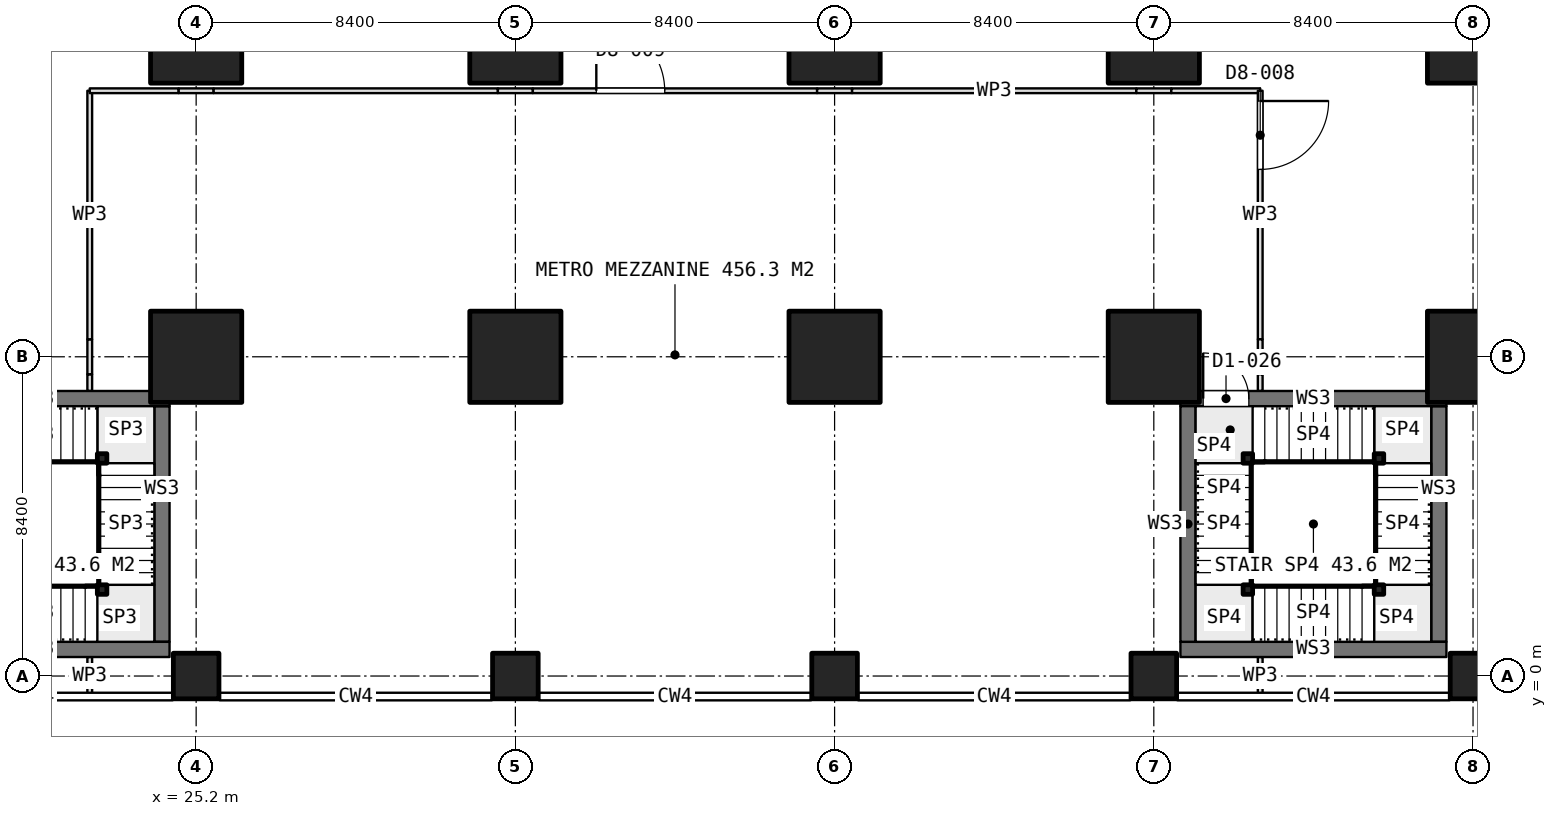
"""IFC4 building model, lengths in metres.
Left out: names, types, materials, properties, quantities, classifications, styles, units other than length and angle.
Written with IfcOpenShell. Run it as: python <this file> out.ifc"""

import sys

from ifc_helpers import new_model, si_unit, direction, frame, frame_2d, origin, origin_2d, place, context, subcontext, project, spatial, rectangle, extrude, element, fill, save


model = new_model("IFC4")
c1 = context("Model", 3, precision=1e-05, world=origin(), true_north=direction((0.0, 1.0)))
c2 = subcontext(c1, "Body", "Model", "MODEL_VIEW")
j1 = project(units=[si_unit("LENGTHUNIT", "METRE"), si_unit("PLANEANGLEUNIT", "RADIAN")], contexts=[c1])
p1 = place(None, origin())
s1 = spatial("IfcSite", under=j1, at=p1, CompositionType="ELEMENT")
p2 = place(p1, origin())
s2 = spatial("IfcBuilding", under=s1, at=p2, CompositionType="ELEMENT")
p3 = place(p2, frame((0.0, 0.0, 5.4)))
s3 = spatial("IfcBuildingStorey", under=s2, at=p3, CompositionType="ELEMENT", Elevation=5.4)
p4 = place(p3, frame((25.2, 0.0, 0.0), z_axis=(0.0, 0.0, 1.0), x_axis=(1.0, 0.0, 0.0)))
e1 = element("IfcColumn", 1, at=p4, inside=s3, PredefinedType="COLUMN", context=c2, shape_type="SweptSolid", body=[
    extrude(rectangle(XDim=1.2, YDim=1.2, at=origin_2d()), origin(), (0.0, 0.0, 1.0), 5.0),
])
for number, where, z_axis, x_axis in (
    (2, (25.2, 8.4, 0.0), (0.0, 0.0, 1.0), (1.0, 0.0, 0.0)),
    (3, (25.2, 16.8, 0.0), (0.0, 0.0, 1.0), (1.0, 0.0, 0.0)),
):
    element("IfcColumn", number, at=place(p3, frame(where, z_axis=z_axis, x_axis=x_axis)), inside=s3, PredefinedType="COLUMN", context=c2, shape_type="SweptSolid", body=[
        extrude(rectangle(XDim=2.4, YDim=2.4, at=origin_2d()), origin(), (0.0, 0.0, 1.0), 5.0),
    ])
p5 = place(p3, frame((33.6, 0.0, 0.0), z_axis=(0.0, 0.0, 1.0), x_axis=(1.0, 0.0, 0.0)))
e4 = element("IfcColumn", 4, at=p5, inside=s3, PredefinedType="COLUMN", context=c2, shape_type="SweptSolid", body=[
    extrude(rectangle(XDim=1.2, YDim=1.2, at=origin_2d()), origin(), (0.0, 0.0, 1.0), 5.0),
])
for number, where, z_axis, x_axis in (
    (5, (33.6, 8.4, 0.0), (0.0, 0.0, 1.0), (1.0, 0.0, 0.0)),
    (6, (33.6, 16.8, 0.0), (0.0, 0.0, 1.0), (1.0, 0.0, 0.0)),
):
    element("IfcColumn", number, at=place(p3, frame(where, z_axis=z_axis, x_axis=x_axis)), inside=s3, PredefinedType="COLUMN", context=c2, shape_type="SweptSolid", body=[
        extrude(rectangle(XDim=2.4, YDim=2.4, at=origin_2d()), origin(), (0.0, 0.0, 1.0), 5.0),
    ])
p6 = place(p3, frame((42.0, 0.0, 0.0), z_axis=(0.0, 0.0, 1.0), x_axis=(1.0, 0.0, 0.0)))
e7 = element("IfcColumn", 7, at=p6, inside=s3, PredefinedType="COLUMN", context=c2, shape_type="SweptSolid", body=[
    extrude(rectangle(XDim=1.2, YDim=1.2, at=origin_2d()), origin(), (0.0, 0.0, 1.0), 5.0),
])
for number, where, z_axis, x_axis in (
    (8, (42.0, 8.4, 0.0), (0.0, 0.0, 1.0), (1.0, 0.0, 0.0)),
    (9, (42.0, 16.8, 0.0), (0.0, 0.0, 1.0), (1.0, 0.0, 0.0)),
):
    element("IfcColumn", number, at=place(p3, frame(where, z_axis=z_axis, x_axis=x_axis)), inside=s3, PredefinedType="COLUMN", context=c2, shape_type="SweptSolid", body=[
        extrude(rectangle(XDim=2.4, YDim=2.4, at=origin_2d()), origin(), (0.0, 0.0, 1.0), 5.0),
    ])
p7 = place(p3, frame((50.4, 0.0, 0.0), z_axis=(0.0, 0.0, 1.0), x_axis=(1.0, 0.0, 0.0)))
e10 = element("IfcColumn", 10, at=p7, inside=s3, PredefinedType="COLUMN", context=c2, shape_type="SweptSolid", body=[
    extrude(rectangle(XDim=1.2, YDim=1.2, at=origin_2d()), origin(), (0.0, 0.0, 1.0), 5.0),
])
for number, where, z_axis, x_axis in (
    (11, (50.4, 8.4, 0.0), (0.0, 0.0, 1.0), (1.0, 0.0, 0.0)),
    (12, (50.4, 16.8, 0.0), (0.0, 0.0, 1.0), (1.0, 0.0, 0.0)),
):
    element("IfcColumn", number, at=place(p3, frame(where, z_axis=z_axis, x_axis=x_axis)), inside=s3, PredefinedType="COLUMN", context=c2, shape_type="SweptSolid", body=[
        extrude(rectangle(XDim=2.4, YDim=2.4, at=origin_2d()), origin(), (0.0, 0.0, 1.0), 5.0),
    ])
p8 = place(p3, frame((58.8, 0.0, 0.0), z_axis=(0.0, 0.0, 1.0), x_axis=(1.0, 0.0, 0.0)))
e13 = element("IfcColumn", 13, at=p8, inside=s3, PredefinedType="COLUMN", context=c2, shape_type="SweptSolid", body=[
    extrude(rectangle(XDim=1.2, YDim=1.2, at=origin_2d()), origin(), (0.0, 0.0, 1.0), 5.0),
])
for number, where, z_axis, x_axis in (
    (14, (58.8, 8.4, 0.0), (0.0, 0.0, 1.0), (1.0, 0.0, 0.0)),
    (15, (58.8, 16.8, 0.0), (0.0, 0.0, 1.0), (1.0, 0.0, 0.0)),
):
    element("IfcColumn", number, at=place(p3, frame(where, z_axis=z_axis, x_axis=x_axis)), inside=s3, PredefinedType="COLUMN", context=c2, shape_type="SweptSolid", body=[
        extrude(rectangle(XDim=2.4, YDim=2.4, at=origin_2d()), origin(), (0.0, 0.0, 1.0), 5.0),
    ])
p9 = place(p3, frame((17.5, 0.7, 0.0), z_axis=(0.0, 0.0, 1.0), x_axis=(1.0, 0.0, 0.0)))
e16 = element("IfcWall", 16, at=p9, inside=s3, PredefinedType="SOLIDWALL", context=c2, shape_type="SweptSolid", body=[
    extrude(rectangle(XDim=7.0, YDim=0.4, at=frame_2d((3.5, 0.0))), origin(), (0.0, 0.0, 1.0), 4.7),
])
p10 = place(p3, frame((17.5, 7.3, 0.0), z_axis=(0.0, 0.0, 1.0), x_axis=(1.0, 0.0, 0.0)))
e17 = element("IfcWall", 17, at=p10, inside=s3, PredefinedType="SOLIDWALL", context=c2, shape_type="SweptSolid", body=[
    extrude(rectangle(XDim=7.0, YDim=0.4, at=frame_2d((3.5, 0.0))), origin(), (0.0, 0.0, 1.0), 4.7),
])
p11 = place(p10, frame((0.6, 0.0, 0.0)))
e18 = element("IfcOpeningElement", 18, at=p11, cuts=e17, PredefinedType="OPENING", context=c2, shape_type="SweptSolid", body=[
    extrude(rectangle(XDim=1.2, YDim=2.1, at=frame_2d((0.6, 1.05))), frame((0.0, 0.21, 0.0), z_axis=(0.0, -1.0, 0.0), x_axis=(1.0, 0.0, 0.0)), (0.0, 0.0, 1.0), 0.42),
])
p12 = place(p3, frame((24.3, 0.9, 0.0), z_axis=(0.0, 0.0, 1.0), x_axis=(0.0, 1.0, 0.0)))
e19 = element("IfcWall", 19, at=p12, inside=s3, PredefinedType="SOLIDWALL", context=c2, shape_type="SweptSolid", body=[
    extrude(rectangle(XDim=6.2, YDim=0.4, at=frame_2d((3.1, 0.0))), origin(), (0.0, 0.0, 1.0), 4.7),
])
p13 = place(p3, frame((51.1, 0.7, 0.0), z_axis=(0.0, 0.0, 1.0), x_axis=(1.0, 0.0, 0.0)))
e20 = element("IfcWall", 20, at=p13, inside=s3, PredefinedType="SOLIDWALL", context=c2, shape_type="SweptSolid", body=[
    extrude(rectangle(XDim=7.0, YDim=0.4, at=frame_2d((3.5, 0.0))), origin(), (0.0, 0.0, 1.0), 4.7),
])
p14 = place(p3, frame((51.1, 7.3, 0.0), z_axis=(0.0, 0.0, 1.0), x_axis=(1.0, 0.0, 0.0)))
e21 = element("IfcWall", 21, at=p14, inside=s3, PredefinedType="SOLIDWALL", context=c2, shape_type="SweptSolid", body=[
    extrude(rectangle(XDim=7.0, YDim=0.4, at=frame_2d((3.5, 0.0))), origin(), (0.0, 0.0, 1.0), 4.7),
])
p15 = place(p14, frame((0.6, 0.0, 0.0)))
e22 = element("IfcOpeningElement", 22, at=p15, cuts=e21, PredefinedType="OPENING", context=c2, shape_type="SweptSolid", body=[
    extrude(rectangle(XDim=1.2, YDim=2.1, at=frame_2d((0.6, 1.05))), frame((0.0, 0.21, 0.0), z_axis=(0.0, -1.0, 0.0), x_axis=(1.0, 0.0, 0.0)), (0.0, 0.0, 1.0), 0.42),
])
for number, where, z_axis, x_axis in (
    (23, (51.3, 0.9, 0.0), (0.0, 0.0, 1.0), (0.0, 1.0, 0.0)),
    (24, (57.9, 0.9, 0.0), (0.0, 0.0, 1.0), (0.0, 1.0, 0.0)),
):
    element("IfcWall", number, at=place(p3, frame(where, z_axis=z_axis, x_axis=x_axis)), inside=s3, PredefinedType="SOLIDWALL", context=c2, shape_type="SweptSolid", body=[
        extrude(rectangle(XDim=6.2, YDim=0.4, at=frame_2d((3.1, 0.0))), origin(), (0.0, 0.0, 1.0), 4.7),
    ])
p16 = place(p3, frame((22.4, 7.5, 0.0), z_axis=(0.0, 0.0, 1.0), x_axis=(0.0, 1.0, 0.0)))
e25 = element("IfcWall", 25, at=p16, inside=s3, PredefinedType="PARTITIONING", context=c2, shape_type="SweptSolid", body=[
    extrude(rectangle(XDim=0.44, YDim=0.125, at=frame_2d((0.22, 0.0))), origin(), (0.0, 0.0, 1.0), 4.7),
])
p17 = place(p3, frame((22.4, 7.94, 0.0), z_axis=(0.0, 0.0, 1.0), x_axis=(0.0, 1.0, 0.0)))
e26 = element("IfcWall", 26, at=p17, inside=s3, PredefinedType="PARTITIONING", context=c2, shape_type="SweptSolid", body=[
    extrude(rectangle(XDim=0.92, YDim=0.125, at=frame_2d((0.46, 0.0))), origin(), (0.0, 0.0, 1.0), 2.9),
])
p18 = place(p3, frame((22.4, 8.86, 0.0), z_axis=(0.0, 0.0, 1.0), x_axis=(0.0, 1.0, 0.0)))
e27 = element("IfcWall", 27, at=p18, inside=s3, PredefinedType="PARTITIONING", context=c2, shape_type="SweptSolid", body=[
    extrude(rectangle(XDim=6.54, YDim=0.125, at=frame_2d((3.27, 0.0))), origin(), (0.0, 0.0, 1.0), 4.7),
])
p19 = place(p3, frame((22.4, 15.4, 0.0), z_axis=(0.0, 0.0, 1.0), x_axis=(1.0, 0.0, 0.0)))
e28 = element("IfcWall", 28, at=p19, inside=s3, PredefinedType="PARTITIONING", context=c2, shape_type="SweptSolid", body=[
    extrude(rectangle(XDim=2.34, YDim=0.125, at=frame_2d((1.17, 0.0))), origin(), (0.0, 0.0, 1.0), 4.7),
])
p20 = place(p3, frame((24.74, 15.4, 0.0), z_axis=(0.0, 0.0, 1.0), x_axis=(1.0, 0.0, 0.0)))
e29 = element("IfcWall", 29, at=p20, inside=s3, PredefinedType="PARTITIONING", context=c2, shape_type="SweptSolid", body=[
    extrude(rectangle(XDim=0.92, YDim=0.125, at=frame_2d((0.46, 0.0))), origin(), (0.0, 0.0, 1.0), 2.9),
])
p21 = place(p3, frame((25.66, 15.4, 0.0), z_axis=(0.0, 0.0, 1.0), x_axis=(1.0, 0.0, 0.0)))
e30 = element("IfcWall", 30, at=p21, inside=s3, PredefinedType="PARTITIONING", context=c2, shape_type="SweptSolid", body=[
    extrude(rectangle(XDim=7.48, YDim=0.125, at=frame_2d((3.74, 0.0))), origin(), (0.0, 0.0, 1.0), 4.7),
])
p22 = place(p3, frame((33.14, 15.4, 0.0), z_axis=(0.0, 0.0, 1.0), x_axis=(1.0, 0.0, 0.0)))
e31 = element("IfcWall", 31, at=p22, inside=s3, PredefinedType="PARTITIONING", context=c2, shape_type="SweptSolid", body=[
    extrude(rectangle(XDim=0.92, YDim=0.125, at=frame_2d((0.46, 0.0))), origin(), (0.0, 0.0, 1.0), 2.9),
])
p23 = place(p3, frame((34.06, 15.4, 0.0), z_axis=(0.0, 0.0, 1.0), x_axis=(1.0, 0.0, 0.0)))
e32 = element("IfcWall", 32, at=p23, inside=s3, PredefinedType="PARTITIONING", context=c2, shape_type="SweptSolid", body=[
    extrude(rectangle(XDim=7.48, YDim=0.125, at=frame_2d((3.74, 0.0))), origin(), (0.0, 0.0, 1.0), 4.7),
])
p24 = place(p23, frame((1.67, 0.0, 0.0)))
e33 = element("IfcOpeningElement", 33, at=p24, cuts=e32, PredefinedType="OPENING", context=c2, shape_type="SweptSolid", body=[
    extrude(rectangle(XDim=1.8, YDim=2.1, at=frame_2d((0.9, 1.05))), frame((0.0, 0.073, 0.0), z_axis=(0.0, -1.0, 0.0), x_axis=(1.0, 0.0, 0.0)), (0.0, 0.0, 1.0), 0.145),
])
p25 = place(p3, frame((41.54, 15.4, 0.0), z_axis=(0.0, 0.0, 1.0), x_axis=(1.0, 0.0, 0.0)))
e34 = element("IfcWall", 34, at=p25, inside=s3, PredefinedType="PARTITIONING", context=c2, shape_type="SweptSolid", body=[
    extrude(rectangle(XDim=0.92, YDim=0.125, at=frame_2d((0.46, 0.0))), origin(), (0.0, 0.0, 1.0), 2.9),
])
p26 = place(p3, frame((42.46, 15.4, 0.0), z_axis=(0.0, 0.0, 1.0), x_axis=(1.0, 0.0, 0.0)))
e35 = element("IfcWall", 35, at=p26, inside=s3, PredefinedType="PARTITIONING", context=c2, shape_type="SweptSolid", body=[
    extrude(rectangle(XDim=7.48, YDim=0.125, at=frame_2d((3.74, 0.0))), origin(), (0.0, 0.0, 1.0), 4.7),
])
p27 = place(p3, frame((49.94, 15.4, 0.0), z_axis=(0.0, 0.0, 1.0), x_axis=(1.0, 0.0, 0.0)))
e36 = element("IfcWall", 36, at=p27, inside=s3, PredefinedType="PARTITIONING", context=c2, shape_type="SweptSolid", body=[
    extrude(rectangle(XDim=0.92, YDim=0.125, at=frame_2d((0.46, 0.0))), origin(), (0.0, 0.0, 1.0), 2.9),
])
p28 = place(p3, frame((50.86, 15.4, 0.0), z_axis=(0.0, 0.0, 1.0), x_axis=(1.0, 0.0, 0.0)))
e37 = element("IfcWall", 37, at=p28, inside=s3, PredefinedType="PARTITIONING", context=c2, shape_type="SweptSolid", body=[
    extrude(rectangle(XDim=2.34, YDim=0.125, at=frame_2d((1.17, 0.0))), origin(), (0.0, 0.0, 1.0), 4.7),
])
p29 = place(p3, frame((53.2, 15.4, 0.0), z_axis=(0.0, 0.0, 1.0), x_axis=(0.0, -1.0, 0.0)))
e38 = element("IfcWall", 38, at=p29, inside=s3, PredefinedType="PARTITIONING", context=c2, shape_type="SweptSolid", body=[
    extrude(rectangle(XDim=6.54, YDim=0.125, at=frame_2d((3.27, 0.0))), origin(), (0.0, 0.0, 1.0), 4.7),
])
p30 = place(p29, frame((0.27, 0.0, 0.0)))
e39 = element("IfcOpeningElement", 39, at=p30, cuts=e38, PredefinedType="OPENING", context=c2, shape_type="SweptSolid", body=[
    extrude(rectangle(XDim=1.8, YDim=2.1, at=frame_2d((0.9, 1.05))), frame((0.0, 0.073, 0.0), z_axis=(0.0, -1.0, 0.0), x_axis=(1.0, 0.0, 0.0)), (0.0, 0.0, 1.0), 0.145),
])
p31 = place(p3, frame((53.2, 8.86, 0.0), z_axis=(0.0, 0.0, 1.0), x_axis=(0.0, -1.0, 0.0)))
e40 = element("IfcWall", 40, at=p31, inside=s3, PredefinedType="PARTITIONING", context=c2, shape_type="SweptSolid", body=[
    extrude(rectangle(XDim=0.92, YDim=0.125, at=frame_2d((0.46, 0.0))), origin(), (0.0, 0.0, 1.0), 2.9),
])
p32 = place(p3, frame((53.2, 7.94, 0.0), z_axis=(0.0, 0.0, 1.0), x_axis=(0.0, -1.0, 0.0)))
e41 = element("IfcWall", 41, at=p32, inside=s3, PredefinedType="PARTITIONING", context=c2, shape_type="SweptSolid", body=[
    extrude(rectangle(XDim=0.44, YDim=0.125, at=frame_2d((0.22, 0.0))), origin(), (0.0, 0.0, 1.0), 4.7),
])
for number, where, z_axis, x_axis in (
    (42, (53.2, 0.5, 0.0), (0.0, 0.0, 1.0), (0.0, -1.0, 0.0)),
    (43, (22.4, -0.49, 0.0), (0.0, 0.0, 1.0), (0.0, 1.0, 0.0)),
):
    element("IfcWall", number, at=place(p3, frame(where, z_axis=z_axis, x_axis=x_axis)), inside=s3, PredefinedType="PARTITIONING", context=c2, shape_type="SweptSolid", body=[
        extrude(rectangle(XDim=0.99, YDim=0.125, at=frame_2d((0.495, 0.0))), origin(), (0.0, 0.0, 1.0), 2.9),
    ])
for number, where, z_axis, x_axis in (
    (44, (22.725, 2.275, 0.0), (0.0, 0.0, 1.0), (1.0, 0.0, 0.0)),
    (45, (22.725, 5.725, 0.0), (0.0, 0.0, 1.0), (1.0, 0.0, 0.0)),
    (46, (52.875, 5.725, 0.0), (0.0, 0.0, 1.0), (1.0, 0.0, 0.0)),
    (47, (52.875, 2.275, 0.0), (0.0, 0.0, 1.0), (1.0, 0.0, 0.0)),
    (48, (56.325, 2.275, 0.0), (0.0, 0.0, 1.0), (1.0, 0.0, 0.0)),
    (49, (56.325, 5.725, 0.0), (0.0, 0.0, 1.0), (1.0, 0.0, 0.0)),
):
    element("IfcColumn", number, at=place(p3, frame(where, z_axis=z_axis, x_axis=x_axis)), inside=s3, PredefinedType="COLUMN", context=c2, shape_type="SweptSolid", body=[
        extrude(rectangle(XDim=0.25, YDim=0.25, at=origin_2d()), origin(), (0.0, 0.0, 1.0), 5.0),
    ])
p33 = place(p24, origin())
e50 = element("IfcDoor", 50, at=p33, inside=s3, OperationType="DOUBLE_DOOR_SINGLE_SWING", PredefinedType="DOOR", context=c2, shape_type="SweptSolid", body=[
    extrude(rectangle(XDim=1.8, YDim=2.1, at=frame_2d((0.9, 1.05))), frame((0.0, 0.025, 0.0), z_axis=(0.0, -1.0, 0.0), x_axis=(1.0, 0.0, 0.0)), (0.0, 0.0, 1.0), 0.05),
])
fill(e33, e50)
p34 = place(p30, origin())
e51 = element("IfcDoor", 51, at=p34, inside=s3, OperationType="DOUBLE_DOOR_SINGLE_SWING", PredefinedType="DOOR", context=c2, shape_type="SweptSolid", body=[
    extrude(rectangle(XDim=1.8, YDim=2.1, at=frame_2d((0.9, 1.05))), frame((0.0, 0.025, 0.0), z_axis=(0.0, -1.0, 0.0), x_axis=(1.0, 0.0, 0.0)), (0.0, 0.0, 1.0), 0.05),
])
fill(e39, e51)
p35 = place(p15, origin())
e52 = element("IfcDoor", 52, at=p35, inside=s3, OperationType="SINGLE_SWING_RIGHT", PredefinedType="DOOR", context=c2, shape_type="SweptSolid", body=[
    extrude(rectangle(XDim=1.2, YDim=2.1, at=frame_2d((0.6, 1.05))), frame((0.0, 0.025, 0.0), z_axis=(0.0, -1.0, 0.0), x_axis=(1.0, 0.0, 0.0)), (0.0, 0.0, 1.0), 0.05),
])
fill(e22, e52)
save(model, sys.argv[1])
